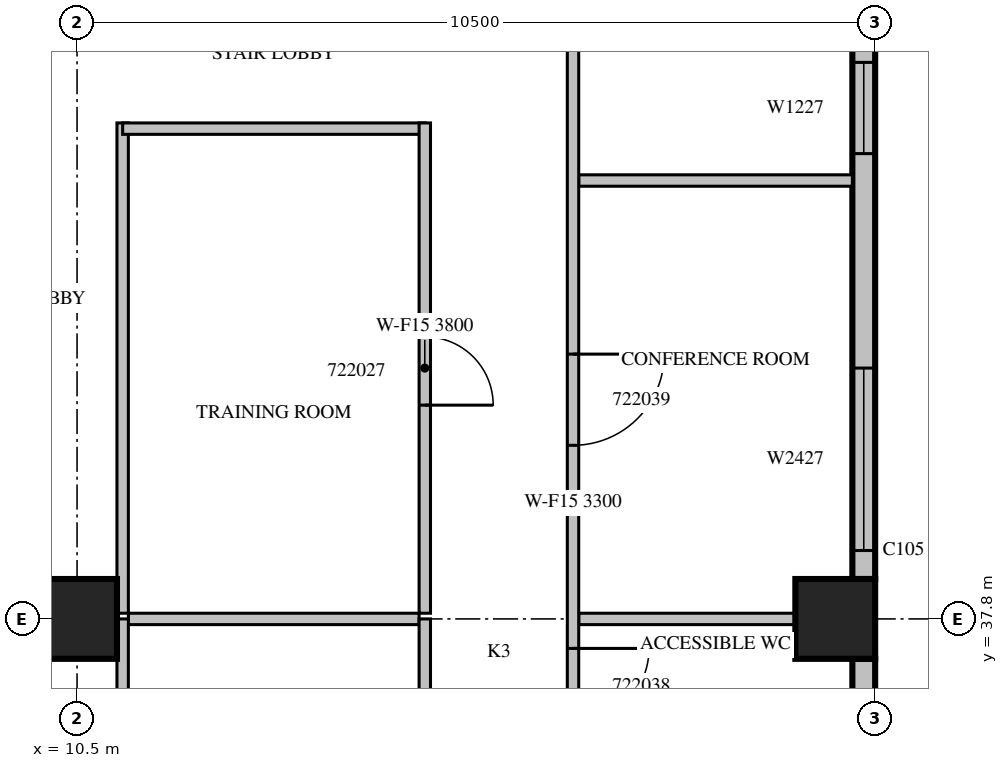
"""IFC4 building model, lengths in metres.
Left out: names, types, materials, properties, quantities, classifications, styles, units other than length and angle.
Written with IfcOpenShell. Run it as: python <this file> out.ifc"""

import sys

from ifc_helpers import new_model, si_unit, direction, frame, frame_2d, origin, origin_2d, place, context, subcontext, project, spatial, rectangle, extrude, source, transform, mapped, element, fill, save


model = new_model("IFC4")
c1 = context("Model", 3, precision=1e-05, world=origin(), true_north=direction((0.0, 1.0)))
c2 = subcontext(c1, "Body", "Model", "MODEL_VIEW")
j1 = project(units=[si_unit("LENGTHUNIT", "METRE"), si_unit("PLANEANGLEUNIT", "RADIAN")], contexts=[c1])
p1 = place(None, origin())
s1 = spatial("IfcSite", under=j1, at=p1, CompositionType="ELEMENT")
p2 = place(p1, origin())
s2 = spatial("IfcBuilding", under=s1, at=p2, CompositionType="ELEMENT")
p3 = place(p2, frame((0.0, 0.0, 103.5)))
s3 = spatial("IfcBuildingStorey", under=s2, at=p3, CompositionType="ELEMENT", Elevation=103.5)
m1 = source(origin(), c2, "Body", "SweptSolid", [
    extrude(rectangle(XDim=1.05, YDim=1.05, at=origin_2d()), origin(), (0.0, 0.0, 1.0), 4.2),
])
for number, where, z_axis, x_axis in (
    (1, (10.5, 37.8, 0.0), (0.0, 0.0, 1.0), (1.0, 0.0, 0.0)),
    (2, (20.475, 37.8, 0.0), (0.0, 0.0, 1.0), (1.0, 0.0, 0.0)),
):
    element("IfcColumn", number, at=place(p3, frame(where, z_axis=z_axis, x_axis=x_axis)), inside=s3, PredefinedType="COLUMN", context=c2, shape_type="MappedRepresentation", body=[
        mapped(m1, transform((0.0, 0.0, 0.0), scale=1.0)),
    ])
p4 = place(p3, frame((20.85, 29.925, 0.0), z_axis=(0.0, 0.0, 1.0), x_axis=(0.0, 1.0, 0.0)))
e3 = element("IfcWall", 3, at=p4, inside=s3, PredefinedType="STANDARD", context=c2, shape_type="SweptSolid", body=[
    extrude(rectangle(XDim=7.35, YDim=0.3, at=frame_2d((3.675, 0.0))), origin(), (0.0, 0.0, 1.0), 3.3),
])
m2 = source(origin(), c2, "Body", "SweptSolid", [
    extrude(rectangle(XDim=2.4, YDim=2.7, at=frame_2d((1.2, 1.35))), frame((0.0, 0.16, 0.0), z_axis=(0.0, -1.0, 0.0), x_axis=(1.0, 0.0, 0.0)), (0.0, 0.0, 1.0), 0.32),
])
p5 = place(p4, frame((0.375, 0.0, 0.6)))
e4 = element("IfcOpeningElement", 4, at=p5, cuts=e3, PredefinedType="OPENING", context=c2, shape_type="MappedRepresentation", body=[
    mapped(m2, transform((0.0, 0.0, 0.0), scale=1.0)),
])
m3 = source(origin(), c2, "Body", "SweptSolid", [
    extrude(rectangle(XDim=1.2, YDim=2.7, at=frame_2d((0.6, 1.35))), frame((0.0, 0.16, 0.0), z_axis=(0.0, -1.0, 0.0), x_axis=(1.0, 0.0, 0.0)), (0.0, 0.0, 1.0), 0.32),
])
p6 = place(p4, frame((4.293, 0.0, 0.6)))
e5 = element("IfcOpeningElement", 5, at=p6, cuts=e3, PredefinedType="OPENING", context=c2, shape_type="MappedRepresentation", body=[
    mapped(m3, transform((0.0, 0.0, 0.0), scale=1.0)),
])
m4 = source(origin(), c2, "Body", "SweptSolid", [
    extrude(rectangle(XDim=7.35, YDim=0.3, at=frame_2d((3.675, 0.0))), origin(), (0.0, 0.0, 1.0), 3.8),
])
p7 = place(p3, frame((20.85, 38.325, 0.0), z_axis=(0.0, 0.0, 1.0), x_axis=(0.0, 1.0, 0.0)))
e6 = element("IfcWall", 6, at=p7, inside=s3, PredefinedType="STANDARD", context=c2, shape_type="MappedRepresentation", body=[
    mapped(m4, transform((0.0, 0.0, 0.0), scale=1.0)),
])
p8 = place(p7, frame((0.375, 0.0, 0.6)))
e7 = element("IfcOpeningElement", 7, at=p8, cuts=e6, PredefinedType="OPENING", context=c2, shape_type="MappedRepresentation", body=[
    mapped(m2, transform((0.0, 0.0, 0.0), scale=1.0)),
])
p9 = place(p7, frame((5.596, 0.0, 0.6)))
e8 = element("IfcOpeningElement", 8, at=p9, cuts=e6, PredefinedType="OPENING", context=c2, shape_type="MappedRepresentation", body=[
    mapped(m3, transform((0.0, 0.0, 0.0), scale=1.0)),
])
m5 = source(origin(), c2, "Body", "SweptSolid", [
    extrude(rectangle(XDim=6.45, YDim=0.15, at=frame_2d((3.225, 0.0))), origin(), (0.0, 0.0, 1.0), 3.8),
])
p10 = place(p3, frame((11.1, 44.325, 0.0), z_axis=(0.0, 0.0, 1.0), x_axis=(0.0, -1.0, 0.0)))
e9 = element("IfcWall", 9, at=p10, inside=s3, PredefinedType="PARTITIONING", context=c2, shape_type="MappedRepresentation", body=[
    mapped(m5, transform((0.0, 0.0, 0.0), scale=1.0)),
])
m6 = source(origin(), c2, "Body", "SweptSolid", [
    extrude(rectangle(XDim=3.975, YDim=0.15, at=frame_2d((1.988, 0.0))), origin(), (0.0, 0.0, 1.0), 3.8),
])
p11 = place(p3, frame((15.075, 44.25, 0.0), z_axis=(0.0, 0.0, 1.0), x_axis=(-1.0, 0.0, 0.0)))
e10 = element("IfcWall", 10, at=p11, inside=s3, PredefinedType="PARTITIONING", context=c2, shape_type="MappedRepresentation", body=[
    mapped(m6, transform((0.0, 0.0, 0.0), scale=1.0)),
])
p12 = place(p3, frame((15.075, 37.875, 0.0), z_axis=(0.0, 0.0, 1.0), x_axis=(0.0, 1.0, 0.0)))
e11 = element("IfcWall", 11, at=p12, inside=s3, PredefinedType="PARTITIONING", context=c2, shape_type="MappedRepresentation", body=[
    mapped(m5, transform((0.0, 0.0, 0.0), scale=1.0)),
])
m7 = source(origin(), c2, "Body", "SweptSolid", [
    extrude(rectangle(XDim=0.9, YDim=2.1, at=frame_2d((0.45, 1.05))), frame((0.0, 0.085, 0.0), z_axis=(0.0, -1.0, 0.0), x_axis=(1.0, 0.0, 0.0)), (0.0, 0.0, 1.0), 0.17),
])
p13 = place(p12, frame((2.737, 0.0, 0.0)))
e12 = element("IfcOpeningElement", 12, at=p13, cuts=e11, PredefinedType="OPENING", context=c2, shape_type="MappedRepresentation", body=[
    mapped(m7, transform((0.0, 0.0, 0.0), scale=1.0)),
])
m8 = source(origin(), c2, "Body", "SweptSolid", [
    extrude(rectangle(XDim=3.825, YDim=0.15, at=frame_2d((1.913, 0.0))), origin(), (0.0, 0.0, 1.0), 3.8),
])
p14 = place(p3, frame((15.0, 37.8, 0.0), z_axis=(0.0, 0.0, 1.0), x_axis=(-1.0, 0.0, 0.0)))
e13 = element("IfcWall", 13, at=p14, inside=s3, PredefinedType="PARTITIONING", context=c2, shape_type="MappedRepresentation", body=[
    mapped(m8, transform((0.0, 0.0, 0.0), scale=1.0)),
])
m9 = source(origin(), c2, "Body", "SweptSolid", [
    extrude(rectangle(XDim=8.4, YDim=0.15, at=frame_2d((4.2, 0.0))), origin(), (0.0, 0.0, 1.0), 3.3),
])
p15 = place(p3, frame((11.1, 29.4, 0.0), z_axis=(0.0, 0.0, 1.0), x_axis=(0.0, 1.0, 0.0)))
e14 = element("IfcWall", 14, at=p15, inside=s3, PredefinedType="PARTITIONING", context=c2, shape_type="MappedRepresentation", body=[
    mapped(m9, transform((0.0, 0.0, 0.0), scale=1.0)),
])
m10 = source(origin(), c2, "Body", "SweptSolid", [
    extrude(rectangle(XDim=1.1, YDim=2.1, at=frame_2d((0.55, 1.05))), frame((0.0, 0.085, 0.0), z_axis=(0.0, -1.0, 0.0), x_axis=(1.0, 0.0, 0.0)), (0.0, 0.0, 1.0), 0.17),
])
p16 = place(p15, frame((5.96, 0.0, 0.0)))
e15 = element("IfcOpeningElement", 15, at=p16, cuts=e14, PredefinedType="OPENING", context=c2, shape_type="MappedRepresentation", body=[
    mapped(m10, transform((0.0, 0.0, 0.0), scale=1.0)),
])
m11 = source(origin(), c2, "Body", "SweptSolid", [
    extrude(rectangle(XDim=3.6, YDim=0.15, at=frame_2d((1.8, 0.0))), origin(), (0.0, 0.0, 1.0), 3.8),
])
p17 = place(p3, frame((17.1, 43.568, 0.0), z_axis=(0.0, 0.0, 1.0), x_axis=(1.0, 0.0, 0.0)))
e16 = element("IfcWall", 16, at=p17, inside=s3, PredefinedType="PARTITIONING", context=c2, shape_type="MappedRepresentation", body=[
    mapped(m11, transform((0.0, 0.0, 0.0), scale=1.0)),
])
m12 = source(origin(), c2, "Body", "SweptSolid", [
    extrude(rectangle(XDim=2.851, YDim=0.15, at=frame_2d((1.425, 0.0))), origin(), (0.0, 0.0, 1.0), 3.8),
])
p18 = place(p3, frame((19.951, 37.8, 0.0), z_axis=(0.0, 0.0, 1.0), x_axis=(-1.0, 0.0, 0.0)))
e17 = element("IfcWall", 17, at=p18, inside=s3, PredefinedType="PARTITIONING", context=c2, shape_type="MappedRepresentation", body=[
    mapped(m12, transform((0.0, 0.0, 0.0), scale=1.0)),
])
p19 = place(p3, frame((15.075, 29.4, 0.0), z_axis=(0.0, 0.0, 1.0), x_axis=(0.0, 1.0, 0.0)))
e18 = element("IfcWall", 18, at=p19, inside=s3, PredefinedType="PARTITIONING", context=c2, shape_type="MappedRepresentation", body=[
    mapped(m9, transform((0.0, 0.0, 0.0), scale=1.0)),
])
p20 = place(p19, frame((6.185, 0.0, 0.0)))
e19 = element("IfcOpeningElement", 19, at=p20, cuts=e18, PredefinedType="OPENING", context=c2, shape_type="MappedRepresentation", body=[
    mapped(m10, transform((0.0, 0.0, 0.0), scale=1.0)),
])
p21 = place(p19, frame((0.682, 0.0, 0.0)))
e20 = element("IfcOpeningElement", 20, at=p21, cuts=e18, PredefinedType="OPENING", context=c2, shape_type="MappedRepresentation", body=[
    mapped(m7, transform((0.0, 0.0, 0.0), scale=1.0)),
])
p22 = place(p19, frame((3.218, 0.0, 0.0)))
e21 = element("IfcOpeningElement", 21, at=p22, cuts=e18, PredefinedType="OPENING", context=c2, shape_type="MappedRepresentation", body=[
    mapped(m7, transform((0.0, 0.0, 0.0), scale=1.0)),
])
p23 = place(p3, frame((17.025, 49.26, 0.0), z_axis=(0.0, 0.0, 1.0), x_axis=(0.0, -1.0, 0.0)))
e22 = element("IfcWall", 22, at=p23, inside=s3, PredefinedType="PARTITIONING", context=c2, shape_type="SweptSolid", body=[
    extrude(rectangle(XDim=19.86, YDim=0.15, at=frame_2d((9.93, 0.0))), origin(), (0.0, 0.0, 1.0), 3.3),
])
m13 = source(origin(), c2, "Body", "SweptSolid", [
    extrude(rectangle(XDim=1.0, YDim=2.1, at=frame_2d((0.5, 1.05))), frame((0.0, 0.085, 0.0), z_axis=(0.0, -1.0, 0.0), x_axis=(1.0, 0.0, 0.0)), (0.0, 0.0, 1.0), 0.17),
])
p24 = place(p23, frame((17.503, 0.0, 0.0)))
e23 = element("IfcOpeningElement", 23, at=p24, cuts=e22, PredefinedType="OPENING", context=c2, shape_type="MappedRepresentation", body=[
    mapped(m13, transform((0.0, 0.0, 0.0), scale=1.0)),
])
p25 = place(p23, frame((14.191, 0.0, 0.0)))
e24 = element("IfcOpeningElement", 24, at=p25, cuts=e22, PredefinedType="OPENING", context=c2, shape_type="MappedRepresentation", body=[
    mapped(m13, transform((0.0, 0.0, 0.0), scale=1.0)),
])
p26 = place(p23, frame((11.848, 0.0, 0.0)))
e25 = element("IfcOpeningElement", 25, at=p26, cuts=e22, PredefinedType="OPENING", context=c2, shape_type="MappedRepresentation", body=[
    mapped(m13, transform((0.0, 0.0, 0.0), scale=1.0)),
])
m14 = source(origin(), c2, "Body", "SweptSolid", [
    extrude(rectangle(XDim=1.2, YDim=2.1, at=frame_2d((0.6, 1.05))), frame((0.0, 0.085, 0.0), z_axis=(0.0, -1.0, 0.0), x_axis=(1.0, 0.0, 0.0)), (0.0, 0.0, 1.0), 0.17),
])
p27 = place(p23, frame((7.976, 0.0, 0.0)))
e26 = element("IfcOpeningElement", 26, at=p27, cuts=e22, PredefinedType="OPENING", context=c2, shape_type="MappedRepresentation", body=[
    mapped(m14, transform((0.0, 0.0, 0.0), scale=1.0)),
])
p28 = place(p23, frame((2.209, 0.0, 0.0)))
e27 = element("IfcOpeningElement", 27, at=p28, cuts=e22, PredefinedType="OPENING", context=c2, shape_type="MappedRepresentation", body=[
    mapped(m14, transform((0.0, 0.0, 0.0), scale=1.0)),
])
m15 = source(origin(), c2, "Body", "SweptSolid", [
    extrude(rectangle(XDim=2.4, YDim=2.7, at=frame_2d((1.2, 1.35))), frame((0.0, 0.03, 0.0), z_axis=(0.0, -1.0, 0.0), x_axis=(1.0, 0.0, 0.0)), (0.0, 0.0, 1.0), 0.06),
])
p29 = place(p8, origin())
e28 = element("IfcWindow", 28, at=p29, inside=s3, PartitioningType="SINGLE_PANEL", PredefinedType="WINDOW", context=c2, shape_type="MappedRepresentation", body=[
    mapped(m15, transform((0.0, 0.0, 0.0), scale=1.0)),
])
fill(e7, e28)
m16 = source(origin(), c2, "Body", "SweptSolid", [
    extrude(rectangle(XDim=1.2, YDim=2.7, at=frame_2d((0.6, 1.35))), frame((0.0, 0.03, 0.0), z_axis=(0.0, -1.0, 0.0), x_axis=(1.0, 0.0, 0.0)), (0.0, 0.0, 1.0), 0.06),
])
p30 = place(p9, origin())
e29 = element("IfcWindow", 29, at=p30, inside=s3, PartitioningType="SINGLE_PANEL", PredefinedType="WINDOW", context=c2, shape_type="MappedRepresentation", body=[
    mapped(m16, transform((0.0, 0.0, 0.0), scale=1.0)),
])
fill(e8, e29)
m17 = source(origin(), c2, "Body", "SweptSolid", [
    extrude(rectangle(XDim=0.9, YDim=2.1, at=frame_2d((0.45, 1.05))), frame((0.0, 0.025, 0.0), z_axis=(0.0, -1.0, 0.0), x_axis=(1.0, 0.0, 0.0)), (0.0, 0.0, 1.0), 0.05),
])
p31 = place(p13, origin())
e30 = element("IfcDoor", 30, at=p31, inside=s3, OperationType="SINGLE_SWING_RIGHT", PredefinedType="DOOR", context=c2, shape_type="MappedRepresentation", body=[
    mapped(m17, transform((0.0, 0.0, 0.0), scale=1.0)),
])
fill(e12, e30)
m18 = source(origin(), c2, "Body", "SweptSolid", [
    extrude(rectangle(XDim=1.0, YDim=2.1, at=frame_2d((0.5, 1.05))), frame((0.0, 0.025, 0.0), z_axis=(0.0, -1.0, 0.0), x_axis=(1.0, 0.0, 0.0)), (0.0, 0.0, 1.0), 0.05),
])
p32 = place(p26, origin())
e31 = element("IfcDoor", 31, at=p32, inside=s3, OperationType="SINGLE_SWING_LEFT", PredefinedType="DOOR", context=c2, shape_type="MappedRepresentation", body=[
    mapped(m18, transform((0.0, 0.0, 0.0), scale=1.0)),
])
fill(e25, e31)
m19 = source(origin(), c2, "Body", "SweptSolid", [
    extrude(rectangle(XDim=1.2, YDim=2.1, at=frame_2d((0.6, 1.05))), frame((0.0, 0.025, 0.0), z_axis=(0.0, -1.0, 0.0), x_axis=(1.0, 0.0, 0.0)), (0.0, 0.0, 1.0), 0.05),
])
p33 = place(p27, origin())
e32 = element("IfcDoor", 32, at=p33, inside=s3, OperationType="SINGLE_SWING_LEFT", PredefinedType="DOOR", context=c2, shape_type="MappedRepresentation", body=[
    mapped(m19, transform((0.0, 0.0, 0.0), scale=1.0)),
])
fill(e26, e32)
save(model, sys.argv[1])
